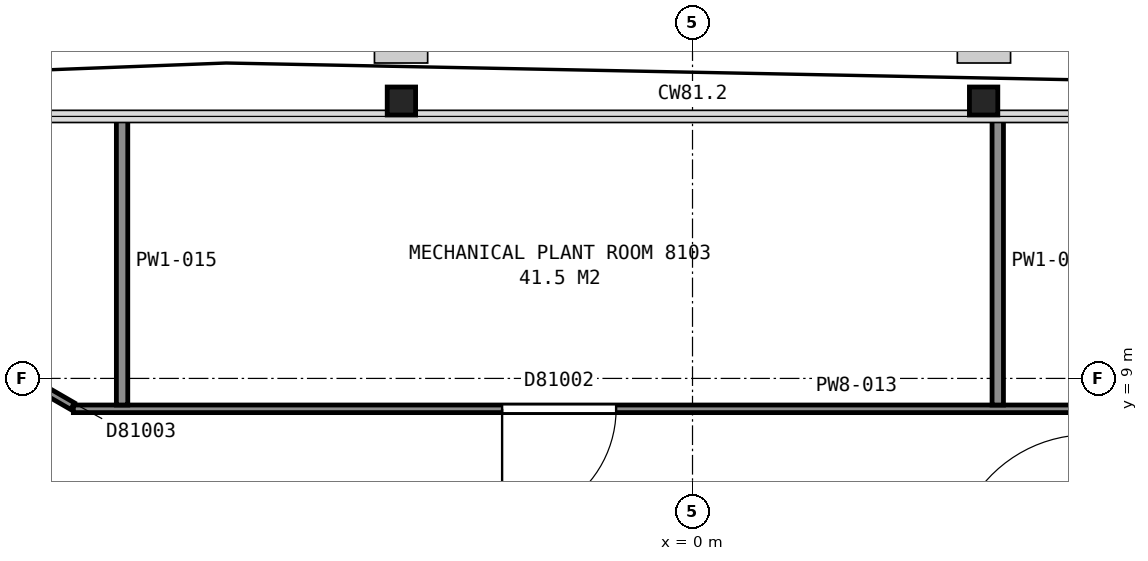
"""IFC4 building model, lengths in metres.
Left out: names, types, materials, properties, quantities, classifications, styles, units other than length and angle.
Written with IfcOpenShell. Run it as: python <this file> out.ifc"""

import sys

from ifc_helpers import new_model, si_unit, direction, frame, frame_2d, origin, origin_2d, place, context, subcontext, project, spatial, rectangle, i_section, extrude, element, fill, save


model = new_model("IFC4")
c1 = context("Model", 3, precision=1e-05, world=origin(), true_north=direction((0.0, 1.0)))
c2 = subcontext(c1, "Body", "Model", "MODEL_VIEW")
j1 = project(units=[si_unit("LENGTHUNIT", "METRE"), si_unit("PLANEANGLEUNIT", "RADIAN")], contexts=[c1])
p1 = place(None, origin())
s1 = spatial("IfcSite", under=j1, at=p1, CompositionType="ELEMENT")
p2 = place(p1, origin())
s2 = spatial("IfcBuilding", under=s1, at=p2, CompositionType="ELEMENT")
p3 = place(p2, frame((0.0, 0.0, 321.0)))
s3 = spatial("IfcBuildingStorey", under=s2, at=p3, CompositionType="ELEMENT", Elevation=321.0)
for number, where, z_axis, x_axis in (
    (1, (3.83, 12.65, 0.0), (0.0, 0.0, 1.0), (1.0, 0.0, 0.0)),
    (2, (-3.83, 12.65, 0.0), (0.0, 0.0, 1.0), (1.0, 0.0, 0.0)),
):
    element("IfcColumn", number, at=place(p3, frame(where, z_axis=z_axis, x_axis=x_axis)), inside=s3, PredefinedType="COLUMN", context=c2, shape_type="SweptSolid", body=[
        extrude(i_section(OverallWidth=0.373, OverallDepth=0.368, WebThickness=0.015, FlangeThickness=0.024, FilletRadius=0.015, at=origin_2d()), origin(), (0.0, 0.0, 1.0), 4.2),
    ])
p4 = place(p3, frame((-6.178, 5.299, 0.0), z_axis=(0.0, 0.0, 1.0), x_axis=(-0.866033125095, 0.499986626058, 0.0)))
e3 = element("IfcWall", 3, at=p4, inside=s3, PredefinedType="PARTITIONING", context=c2, shape_type="SweptSolid", body=[
    extrude(rectangle(XDim=7.2, YDim=0.2, at=frame_2d((3.6, 0.0))), origin(), (0.0, 0.0, 1.0), 3.95),
])
p5 = place(p3, frame((-11.714, 10.689, 0.0), z_axis=(0.0, 0.0, 1.0), x_axis=(0.866029215606, -0.499993397673, 0.0)))
e4 = element("IfcWall", 4, at=p5, inside=s3, PredefinedType="PARTITIONING", context=c2, shape_type="SweptSolid", body=[
    extrude(rectangle(XDim=4.108, YDim=0.1, at=frame_2d((2.054, 0.0))), origin(), (0.0, 0.0, 1.0), 3.297),
])
p6 = place(p5, frame((1.35, 0.0, 0.0)))
e5 = element("IfcOpeningElement", 5, at=p6, cuts=e4, PredefinedType="OPENING", context=c2, shape_type="SweptSolid", body=[
    extrude(rectangle(XDim=1.5, YDim=2.1, at=frame_2d((0.75, 1.05))), frame((0.0, 0.06, 0.0), z_axis=(0.0, -1.0, 0.0), x_axis=(1.0, 0.0, 0.0)), (0.0, 0.0, 1.0), 0.12),
])
p7 = place(p3, frame((-8.146, 8.6, 0.0), z_axis=(0.0, 0.0, 1.0), x_axis=(1.0, 0.0, 0.0)))
e6 = element("IfcWall", 6, at=p7, inside=s3, PredefinedType="PARTITIONING", context=c2, shape_type="SweptSolid", body=[
    extrude(rectangle(XDim=16.292, YDim=0.1, at=frame_2d((8.146, 0.0))), origin(), (0.0, 0.0, 1.0), 3.297),
])
p8 = place(p7, frame((13.462, 0.0, 0.0)))
e7 = element("IfcOpeningElement", 7, at=p8, cuts=e6, PredefinedType="OPENING", context=c2, shape_type="SweptSolid", body=[
    extrude(rectangle(XDim=1.5, YDim=2.1, at=frame_2d((0.75, 1.05))), frame((0.0, 0.06, 0.0), z_axis=(0.0, -1.0, 0.0), x_axis=(1.0, 0.0, 0.0)), (0.0, 0.0, 1.0), 0.12),
])
p9 = place(p7, frame((5.641, 0.0, 0.0)))
e8 = element("IfcOpeningElement", 8, at=p9, cuts=e6, PredefinedType="OPENING", context=c2, shape_type="SweptSolid", body=[
    extrude(rectangle(XDim=1.5, YDim=2.1, at=frame_2d((0.75, 1.05))), frame((0.0, 0.06, 0.0), z_axis=(0.0, -1.0, 0.0), x_axis=(1.0, 0.0, 0.0)), (0.0, 0.0, 1.0), 0.12),
])
for number, where, z_axis, x_axis in (
    (9, (-7.505, 8.65, 0.0), (0.0, 0.0, 1.0), (0.0, 1.0, 0.0)),
    (10, (4.016, 8.65, 0.0), (0.0, 0.0, 1.0), (0.0, 1.0, 0.0)),
):
    element("IfcWall", number, at=place(p3, frame(where, z_axis=z_axis, x_axis=x_axis)), inside=s3, PredefinedType="PARTITIONING", context=c2, shape_type="SweptSolid", body=[
        extrude(rectangle(XDim=3.783, YDim=0.15, at=frame_2d((1.892, 0.0))), origin(), (0.0, 0.0, 1.0), 3.297),
    ])
p10 = place(p9, origin())
e11 = element("IfcDoor", 11, at=p10, inside=s3, OperationType="DOUBLE_DOOR_SINGLE_SWING", PredefinedType="DOOR", context=c2, shape_type="SweptSolid", body=[
    extrude(rectangle(XDim=1.5, YDim=2.1, at=frame_2d((0.75, 1.05))), frame((0.0, 0.025, 0.0), z_axis=(0.0, -1.0, 0.0), x_axis=(1.0, 0.0, 0.0)), (0.0, 0.0, 1.0), 0.05),
])
fill(e8, e11)
save(model, sys.argv[1])
